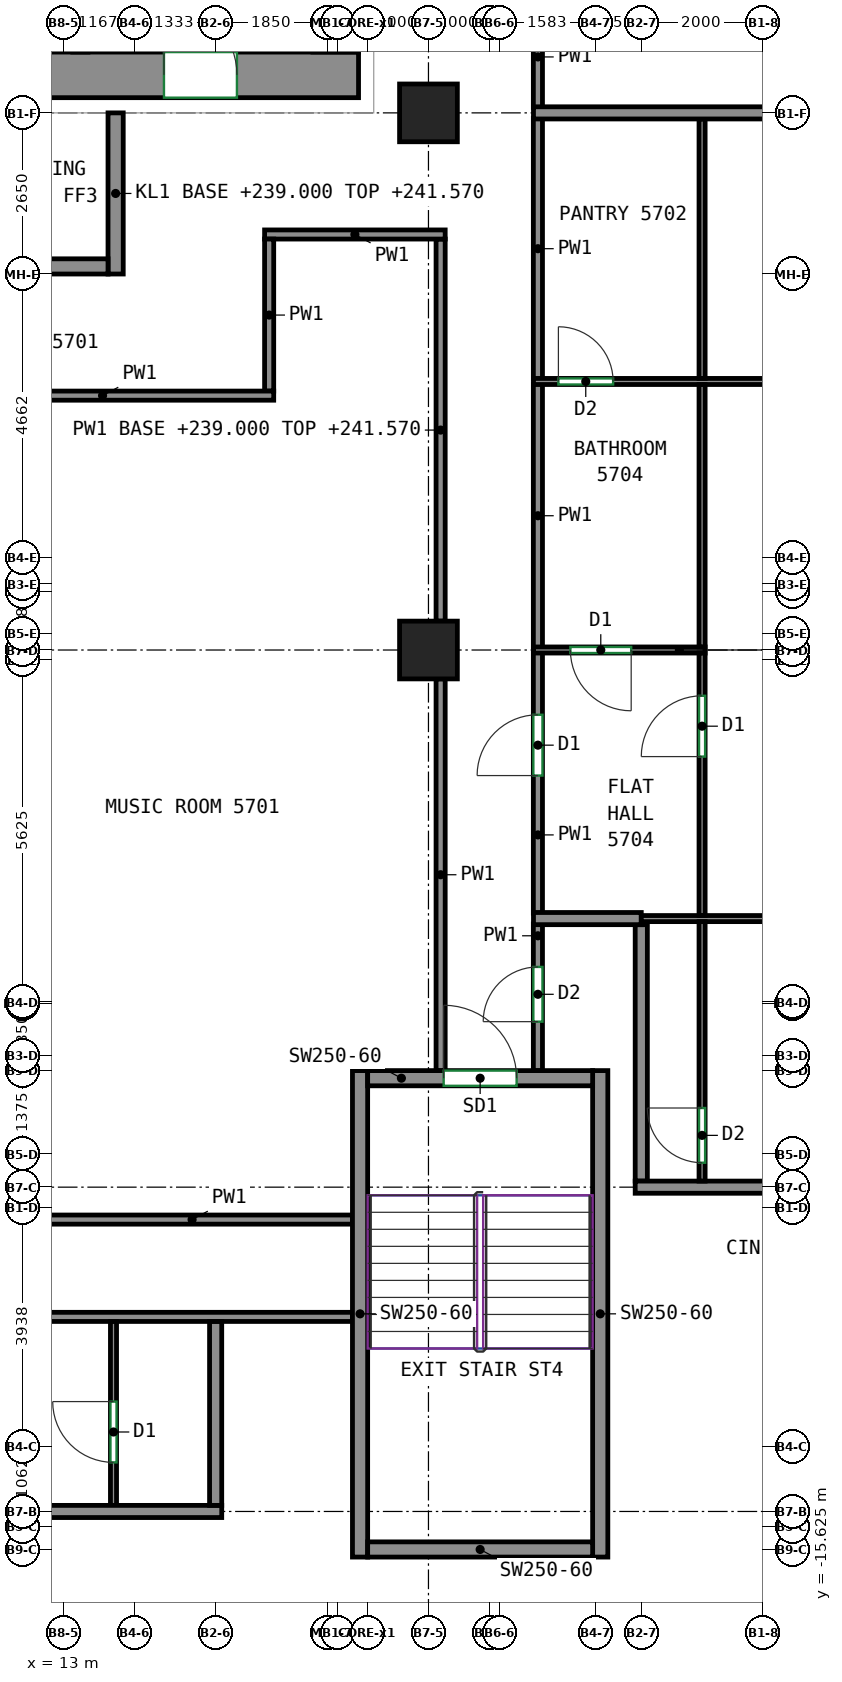
"""IFC4 building model, lengths in metres.
Left out: names, types, materials, properties, quantities, classifications, styles, units other than length and angle.
Written with IfcOpenShell. Run it as: python <this file> out.ifc"""

import sys

from ifc_helpers import new_model, si_unit, direction, frame, frame_2d, origin, origin_2d, place, context, subcontext, project, spatial, rectangle, extrude, source, transform, mapped, element, fill, save


model = new_model("IFC4")
c1 = context("Model", 3, precision=1e-05, world=origin(), true_north=direction((0.0, 1.0)))
c2 = subcontext(c1, "Body", "Model", "MODEL_VIEW")
j1 = project(units=[si_unit("LENGTHUNIT", "METRE"), si_unit("PLANEANGLEUNIT", "RADIAN")], contexts=[c1])
p1 = place(None, origin())
s1 = spatial("IfcSite", under=j1, at=p1, CompositionType="ELEMENT")
p2 = place(p1, origin())
s2 = spatial("IfcBuilding", under=s1, at=p2, CompositionType="ELEMENT")
p3 = place(p2, frame((0.0, 0.0, 239.0)))
s3 = spatial("IfcBuildingStorey", under=s2, at=p3, CompositionType="ELEMENT", Elevation=239.0)
m1 = source(origin(), c2, "Body", "SweptSolid", [
    extrude(rectangle(XDim=0.95, YDim=0.95, at=origin_2d()), origin(), (0.0, 0.0, 1.0), 3.12),
])
for number, where, z_axis, x_axis in (
    (1, (19.0, -0.833, 0.0), (0.0, 0.0, 1.0), (1.0, 0.0, 0.0)),
    (2, (19.0, 8.0, 0.0), (0.0, 0.0, 1.0), (1.0, 0.0, 0.0)),
):
    element("IfcColumn", number, at=place(p3, frame(where, z_axis=z_axis, x_axis=x_axis)), inside=s3, PredefinedType="COLUMN", context=c2, shape_type="MappedRepresentation", body=[
        mapped(m1, transform((0.0, 0.0, 0.0))),
    ])
m2 = source(origin(), c2, "Body", "SweptSolid", [
    extrude(rectangle(XDim=5.38, YDim=0.75, at=frame_2d((2.69, 0.0))), origin(), (0.0, 0.0, 1.0), 3.12),
])
p4 = place(p3, frame((12.47, 8.625, 0.0), z_axis=(0.0, 0.0, 1.0), x_axis=(1.0, 0.0, 0.0)))
e3 = element("IfcWall", 3, at=p4, inside=s3, PredefinedType="SHEAR", context=c2, shape_type="MappedRepresentation", body=[
    mapped(m2, transform((0.0, 0.0, 0.0))),
])
p5 = place(p4, frame((2.18, 0.0, 0.0)))
e4 = element("IfcOpeningElement", 4, at=p5, cuts=e3, PredefinedType="OPENING", context=c2, shape_type="SweptSolid", body=[
    extrude(rectangle(XDim=1.2, YDim=2.1, at=frame_2d((0.6, 1.05))), frame((0.0, 0.385, 0.0), z_axis=(0.0, -1.0, 0.0), x_axis=(1.0, 0.0, 0.0)), (0.0, 0.0, 1.0), 0.77),
])
m3 = source(origin(), c2, "Body", "SweptSolid", [
    extrude(rectangle(XDim=8.0, YDim=0.25, at=frame_2d((4.0, 0.0))), origin(), (0.0, 0.0, 1.0), 3.12),
])
for number, where, z_axis, x_axis in (
    (5, (17.875, -15.75, 0.0), (0.0, 0.0, 1.0), (0.0, 1.0, 0.0)),
    (6, (21.825, -15.75, 0.0), (0.0, 0.0, 1.0), (0.0, 1.0, 0.0)),
):
    element("IfcWall", number, at=place(p3, frame(where, z_axis=z_axis, x_axis=x_axis)), inside=s3, PredefinedType="SHEAR", context=c2, shape_type="MappedRepresentation", body=[
        mapped(m3, transform((0.0, 0.0, 0.0))),
    ])
m4 = source(origin(), c2, "Body", "SweptSolid", [
    extrude(rectangle(XDim=3.7, YDim=0.25, at=frame_2d((1.85, 0.0))), origin(), (0.0, 0.0, 1.0), 3.12),
])
p6 = place(p3, frame((18.0, -15.625, 0.0), z_axis=(0.0, 0.0, 1.0), x_axis=(1.0, 0.0, 0.0)))
e7 = element("IfcWall", 7, at=p6, inside=s3, PredefinedType="SHEAR", context=c2, shape_type="MappedRepresentation", body=[
    mapped(m4, transform((0.0, 0.0, 0.0))),
])
p7 = place(p3, frame((18.0, -7.875, 0.0), z_axis=(0.0, 0.0, 1.0), x_axis=(1.0, 0.0, 0.0)))
e8 = element("IfcWall", 8, at=p7, inside=s3, PredefinedType="SHEAR", context=c2, shape_type="MappedRepresentation", body=[
    mapped(m4, transform((0.0, 0.0, 0.0))),
])
p8 = place(p7, frame((1.25, 0.0, 0.0)))
e9 = element("IfcOpeningElement", 9, at=p8, cuts=e8, PredefinedType="OPENING", context=c2, shape_type="SweptSolid", body=[
    extrude(rectangle(XDim=1.2, YDim=2.1, at=frame_2d((0.6, 1.05))), frame((0.0, 0.135, 0.0), z_axis=(0.0, -1.0, 0.0), x_axis=(1.0, 0.0, 0.0)), (0.0, 0.0, 1.0), 0.27),
])
m5 = source(origin(), c2, "Body", "SweptSolid", [
    extrude(rectangle(XDim=2.65, YDim=0.25, at=frame_2d((1.325, 0.0))), origin(), (0.0, 0.0, 1.0), 2.57),
])
p9 = place(p3, frame((13.855, 5.35, 0.0), z_axis=(0.0, 0.0, 1.0), x_axis=(0.0, 1.0, 0.0)))
e10 = element("IfcWall", 10, at=p9, inside=s3, PredefinedType="PARTITIONING", context=c2, shape_type="MappedRepresentation", body=[
    mapped(m5, transform((0.0, 0.0, 0.0))),
])
m6 = source(origin(), c2, "Body", "SweptSolid", [
    extrude(rectangle(XDim=3.0, YDim=0.25, at=frame_2d((1.5, 0.0))), origin(), (0.0, 0.0, 1.0), 3.12),
])
p10 = place(p3, frame((10.73, 5.475, 0.0), z_axis=(0.0, 0.0, 1.0), x_axis=(1.0, 0.0, 0.0)))
e11 = element("IfcWall", 11, at=p10, inside=s3, PredefinedType="PARTITIONING", context=c2, shape_type="MappedRepresentation", body=[
    mapped(m6, transform((0.0, 0.0, 0.0))),
])
p11 = place(p10, frame((1.1, 0.0, 0.0)))
e12 = element("IfcOpeningElement", 12, at=p11, cuts=e11, PredefinedType="OPENING", context=c2, shape_type="SweptSolid", body=[
    extrude(rectangle(XDim=0.8, YDim=2.0, at=frame_2d((0.4, 1.0))), frame((0.0, 0.135, 0.0), z_axis=(0.0, -1.0, 0.0), x_axis=(1.0, 0.0, 0.0)), (0.0, 0.0, 1.0), 0.27),
])
p12 = place(p3, frame((-11.8, -11.8, 0.0), z_axis=(0.0, 0.0, 1.0), x_axis=(1.0, 0.0, 0.0)))
e13 = element("IfcWall", 13, at=p12, inside=s3, PredefinedType="PARTITIONING", context=c2, shape_type="SweptSolid", body=[
    extrude(rectangle(XDim=29.55, YDim=0.15, at=frame_2d((14.775, 0.0))), origin(), (0.0, 0.0, 1.0), 3.12),
])
p13 = place(p12, frame((4.802, 0.0, 0.0)))
e14 = element("IfcOpeningElement", 14, at=p13, cuts=e13, PredefinedType="OPENING", context=c2, shape_type="SweptSolid", body=[
    extrude(rectangle(XDim=1.0, YDim=2.1, at=frame_2d((0.5, 1.05))), frame((0.0, 0.085, 0.0), z_axis=(0.0, -1.0, 0.0), x_axis=(1.0, 0.0, 0.0)), (0.0, 0.0, 1.0), 0.17),
])
p14 = place(p12, frame((23.314, 0.0, 0.0)))
e15 = element("IfcOpeningElement", 15, at=p14, cuts=e13, PredefinedType="OPENING", context=c2, shape_type="SweptSolid", body=[
    extrude(rectangle(XDim=1.0, YDim=2.1, at=frame_2d((0.5, 1.05))), frame((0.0, 0.085, 0.0), z_axis=(0.0, -1.0, 0.0), x_axis=(1.0, 0.0, 0.0)), (0.0, 0.0, 1.0), 0.17),
])
p15 = place(p3, frame((20.8, -7.75, 0.0), z_axis=(0.0, 0.0, 1.0), x_axis=(0.0, 1.0, 0.0)))
e16 = element("IfcWall", 16, at=p15, inside=s3, PredefinedType="PARTITIONING", context=c2, shape_type="SweptSolid", body=[
    extrude(rectangle(XDim=2.41, YDim=0.15, at=frame_2d((1.205, 0.0))), origin(), (0.0, 0.0, 1.0), 3.12),
])
p16 = place(p15, frame((0.805, 0.0, 0.0)))
e17 = element("IfcOpeningElement", 17, at=p16, cuts=e16, PredefinedType="OPENING", context=c2, shape_type="SweptSolid", body=[
    extrude(rectangle(XDim=0.9, YDim=2.1, at=frame_2d((0.45, 1.05))), frame((0.0, 0.085, 0.0), z_axis=(0.0, -1.0, 0.0), x_axis=(1.0, 0.0, 0.0)), (0.0, 0.0, 1.0), 0.17),
])
p17 = place(p3, frame((20.8, -5.16, 0.0), z_axis=(0.0, 0.0, 1.0), x_axis=(0.0, 1.0, 0.0)))
e18 = element("IfcWall", 18, at=p17, inside=s3, PredefinedType="PARTITIONING", context=c2, shape_type="SweptSolid", body=[
    extrude(rectangle(XDim=4.287, YDim=0.15, at=frame_2d((2.144, 0.0))), origin(), (0.0, 0.0, 1.0), 3.12),
])
p18 = place(p17, frame((2.262, 0.0, 0.0)))
e19 = element("IfcOpeningElement", 19, at=p18, cuts=e18, PredefinedType="OPENING", context=c2, shape_type="SweptSolid", body=[
    extrude(rectangle(XDim=1.0, YDim=2.1, at=frame_2d((0.5, 1.05))), frame((0.0, 0.085, 0.0), z_axis=(0.0, -1.0, 0.0), x_axis=(1.0, 0.0, 0.0)), (0.0, 0.0, 1.0), 0.17),
])
p19 = place(p3, frame((20.8, -0.793, 0.0), z_axis=(0.0, 0.0, 1.0), x_axis=(0.0, 1.0, 0.0)))
e20 = element("IfcWall", 20, at=p19, inside=s3, PredefinedType="PARTITIONING", context=c2, shape_type="SweptSolid", body=[
    extrude(rectangle(XDim=4.336, YDim=0.15, at=frame_2d((2.168, 0.0))), origin(), (0.0, 0.0, 1.0), 3.12),
])
p20 = place(p3, frame((20.8, 3.623, 0.0), z_axis=(0.0, 0.0, 1.0), x_axis=(0.0, 1.0, 0.0)))
e21 = element("IfcWall", 21, at=p20, inside=s3, PredefinedType="PARTITIONING", context=c2, shape_type="SweptSolid", body=[
    extrude(rectangle(XDim=4.287, YDim=0.15, at=frame_2d((2.144, 0.0))), origin(), (0.0, 0.0, 1.0), 3.12),
])
p21 = place(p3, frame((20.8, 8.09, 0.0), z_axis=(0.0, 0.0, 1.0), x_axis=(0.0, 1.0, 0.0)))
e22 = element("IfcWall", 22, at=p21, inside=s3, PredefinedType="PARTITIONING", context=c2, shape_type="SweptSolid", body=[
    extrude(rectangle(XDim=1.66, YDim=0.15, at=frame_2d((0.83, 0.0))), origin(), (0.0, 0.0, 1.0), 3.12),
])
p22 = place(p3, frame((19.2, -7.75, 0.0), z_axis=(0.0, 0.0, 1.0), x_axis=(0.0, 1.0, 0.0)))
e23 = element("IfcWall", 23, at=p22, inside=s3, PredefinedType="PARTITIONING", context=c2, shape_type="SweptSolid", body=[
    extrude(rectangle(XDim=6.442, YDim=0.15, at=frame_2d((3.221, 0.0))), origin(), (0.0, 0.0, 1.0), 3.12),
])
p23 = place(p3, frame((19.2, -0.358, 0.0), z_axis=(0.0, 0.0, 1.0), x_axis=(0.0, 1.0, 0.0)))
e24 = element("IfcWall", 24, at=p23, inside=s3, PredefinedType="PARTITIONING", context=c2, shape_type="SweptSolid", body=[
    extrude(rectangle(XDim=6.283, YDim=0.15, at=frame_2d((3.142, 0.0))), origin(), (0.0, 0.0, 1.0), 2.57),
])
p24 = place(p3, frame((16.305, 6.0, 0.0), z_axis=(0.0, 0.0, 1.0), x_axis=(1.0, 0.0, 0.0)))
e25 = element("IfcWall", 25, at=p24, inside=s3, PredefinedType="PARTITIONING", context=c2, shape_type="SweptSolid", body=[
    extrude(rectangle(XDim=2.97, YDim=0.15, at=frame_2d((1.485, 0.0))), origin(), (0.0, 0.0, 1.0), 3.12),
])
p25 = place(p3, frame((16.38, 3.425, 0.0), z_axis=(0.0, 0.0, 1.0), x_axis=(0.0, 1.0, 0.0)))
e26 = element("IfcWall", 26, at=p25, inside=s3, PredefinedType="PARTITIONING", context=c2, shape_type="SweptSolid", body=[
    extrude(rectangle(XDim=2.5, YDim=0.15, at=frame_2d((1.25, 0.0))), origin(), (0.0, 0.0, 1.0), 3.12),
])
p26 = place(p3, frame((10.825, 3.35, 0.0), z_axis=(0.0, 0.0, 1.0), x_axis=(1.0, 0.0, 0.0)))
e27 = element("IfcWall", 27, at=p26, inside=s3, PredefinedType="PARTITIONING", context=c2, shape_type="SweptSolid", body=[
    extrude(rectangle(XDim=5.63, YDim=0.15, at=frame_2d((2.815, 0.0))), origin(), (0.0, 0.0, 1.0), 3.12),
])
p27 = place(p3, frame((12.475, -10.2, 0.0), z_axis=(0.0, 0.0, 1.0), x_axis=(1.0, 0.0, 0.0)))
e28 = element("IfcWall", 28, at=p27, inside=s3, PredefinedType="PARTITIONING", context=c2, shape_type="SweptSolid", body=[
    extrude(rectangle(XDim=5.275, YDim=0.15, at=frame_2d((2.637, 0.0))), origin(), (0.0, 0.0, 1.0), 3.12),
])
p28 = place(p3, frame((13.82, -14.9, 0.0), z_axis=(0.0, 0.0, 1.0), x_axis=(0.0, 1.0, 0.0)))
e29 = element("IfcWall", 29, at=p28, inside=s3, PredefinedType="PARTITIONING", context=c2, shape_type="SweptSolid", body=[
    extrude(rectangle(XDim=3.023, YDim=0.1, at=frame_2d((1.511, 0.0))), origin(), (0.0, 0.0, 1.0), 3.12),
])
p29 = place(p28, frame((0.707, 0.0, 0.0)))
e30 = element("IfcOpeningElement", 30, at=p29, cuts=e29, PredefinedType="OPENING", context=c2, shape_type="SweptSolid", body=[
    extrude(rectangle(XDim=1.0, YDim=2.1, at=frame_2d((0.5, 1.05))), frame((0.0, 0.06, 0.0), z_axis=(0.0, -1.0, 0.0), x_axis=(1.0, 0.0, 0.0)), (0.0, 0.0, 1.0), 0.12),
])
p30 = place(p3, frame((11.9, -15.0, 0.0), z_axis=(0.0, 0.0, 1.0), x_axis=(1.0, 0.0, 0.0)))
e31 = element("IfcWall", 31, at=p30, inside=s3, PredefinedType="PARTITIONING", context=c2, shape_type="SweptSolid", body=[
    extrude(rectangle(XDim=3.7, YDim=0.2, at=frame_2d((1.85, 0.0))), origin(), (0.0, 0.0, 1.0), 3.12),
])
p31 = place(p3, frame((15.5, -14.9, 0.0), z_axis=(0.0, 0.0, 1.0), x_axis=(0.0, 1.0, 0.0)))
e32 = element("IfcWall", 32, at=p31, inside=s3, PredefinedType="PARTITIONING", context=c2, shape_type="SweptSolid", body=[
    extrude(rectangle(XDim=3.023, YDim=0.2, at=frame_2d((1.511, 0.0))), origin(), (0.0, 0.0, 1.0), 3.12),
])
p32 = place(p3, frame((22.5, -9.567, 0.0), z_axis=(0.0, 0.0, 1.0), x_axis=(0.0, 1.0, 0.0)))
e33 = element("IfcWall", 33, at=p32, inside=s3, PredefinedType="PARTITIONING", context=c2, shape_type="SweptSolid", body=[
    extrude(rectangle(XDim=4.217, YDim=0.2, at=frame_2d((2.108, 0.0))), origin(), (0.0, 0.0, 1.0), 3.12),
])
p33 = place(p3, frame((22.4, -9.667, 0.0), z_axis=(0.0, 0.0, 1.0), x_axis=(1.0, 0.0, 0.0)))
e34 = element("IfcWall", 34, at=p33, inside=s3, PredefinedType="PARTITIONING", context=c2, shape_type="SweptSolid", body=[
    extrude(rectangle(XDim=6.3, YDim=0.2, at=frame_2d((3.15, 0.0))), origin(), (0.0, 0.0, 1.0), 3.12),
])
p34 = place(p3, frame((20.727, -5.25, 0.0), z_axis=(0.0, 0.0, 1.0), x_axis=(1.0, 0.0, 0.0)))
e35 = element("IfcWall", 35, at=p34, inside=s3, PredefinedType="PARTITIONING", context=c2, shape_type="SweptSolid", body=[
    extrude(rectangle(XDim=1.773, YDim=0.2, at=frame_2d((0.886, 0.0))), origin(), (0.0, 0.0, 1.0), 3.12),
])
p35 = place(p3, frame((22.5, -5.25, 0.0), z_axis=(0.0, 0.0, 1.0), x_axis=(1.0, 0.0, 0.0)))
e36 = element("IfcWall", 36, at=p35, inside=s3, PredefinedType="PARTITIONING", context=c2, shape_type="SweptSolid", body=[
    extrude(rectangle(XDim=6.75, YDim=0.1, at=frame_2d((3.375, 0.0))), origin(), (0.0, 0.0, 1.0), 3.12),
])
p36 = place(p35, frame((3.022, 0.0, 0.0)))
e37 = element("IfcOpeningElement", 37, at=p36, cuts=e36, PredefinedType="OPENING", context=c2, shape_type="SweptSolid", body=[
    extrude(rectangle(XDim=0.9, YDim=2.1, at=frame_2d((0.45, 1.05))), frame((0.0, 0.06, 0.0), z_axis=(0.0, -1.0, 0.0), x_axis=(1.0, 0.0, 0.0)), (0.0, 0.0, 1.0), 0.12),
])
p37 = place(p3, frame((23.5, -9.567, 0.0), z_axis=(0.0, 0.0, 1.0), x_axis=(0.0, 1.0, 0.0)))
e38 = element("IfcWall", 38, at=p37, inside=s3, PredefinedType="PARTITIONING", context=c2, shape_type="SweptSolid", body=[
    extrude(rectangle(XDim=4.267, YDim=0.1, at=frame_2d((2.133, 0.0))), origin(), (0.0, 0.0, 1.0), 3.12),
])
p38 = place(p37, frame((0.302, 0.0, 0.0)))
e39 = element("IfcOpeningElement", 39, at=p38, cuts=e38, PredefinedType="OPENING", context=c2, shape_type="SweptSolid", body=[
    extrude(rectangle(XDim=0.9, YDim=2.1, at=frame_2d((0.45, 1.05))), frame((0.0, 0.06, 0.0), z_axis=(0.0, -1.0, 0.0), x_axis=(1.0, 0.0, 0.0)), (0.0, 0.0, 1.0), 0.12),
])
p39 = place(p3, frame((23.55, -0.833, 0.0), z_axis=(0.0, 0.0, 1.0), x_axis=(-1.0, 0.0, 0.0)))
e40 = element("IfcWall", 40, at=p39, inside=s3, PredefinedType="PARTITIONING", context=c2, shape_type="SweptSolid", body=[
    extrude(rectangle(XDim=2.823, YDim=0.1, at=frame_2d((1.412, 0.0))), origin(), (0.0, 0.0, 1.0), 2.57),
])
p40 = place(p39, frame((1.216, 0.0, 0.0)))
e41 = element("IfcOpeningElement", 41, at=p40, cuts=e40, PredefinedType="OPENING", context=c2, shape_type="SweptSolid", body=[
    extrude(rectangle(XDim=1.0, YDim=2.1, at=frame_2d((0.5, 1.05))), frame((0.0, 0.06, 0.0), z_axis=(0.0, -1.0, 0.0), x_axis=(1.0, 0.0, 0.0)), (0.0, 0.0, 1.0), 0.12),
])
p41 = place(p3, frame((23.5, -5.2, 0.0), z_axis=(0.0, 0.0, 1.0), x_axis=(0.0, 1.0, 0.0)))
e42 = element("IfcWall", 42, at=p41, inside=s3, PredefinedType="PARTITIONING", context=c2, shape_type="SweptSolid", body=[
    extrude(rectangle(XDim=4.317, YDim=0.1, at=frame_2d((2.158, 0.0))), origin(), (0.0, 0.0, 1.0), 3.12),
])
p42 = place(p41, frame((2.614, 0.0, 0.0)))
e43 = element("IfcOpeningElement", 43, at=p42, cuts=e42, PredefinedType="OPENING", context=c2, shape_type="SweptSolid", body=[
    extrude(rectangle(XDim=1.0, YDim=2.1, at=frame_2d((0.5, 1.05))), frame((0.0, 0.06, 0.0), z_axis=(0.0, -1.0, 0.0), x_axis=(1.0, 0.0, 0.0)), (0.0, 0.0, 1.0), 0.12),
])
p43 = place(p3, frame((20.727, 3.583, 0.0), z_axis=(0.0, 0.0, 1.0), x_axis=(1.0, 0.0, 0.0)))
e44 = element("IfcWall", 44, at=p43, inside=s3, PredefinedType="PARTITIONING", context=c2, shape_type="SweptSolid", body=[
    extrude(rectangle(XDim=8.523, YDim=0.1, at=frame_2d((4.261, 0.0))), origin(), (0.0, 0.0, 1.0), 3.12),
])
p44 = place(p43, frame((0.41, 0.0, 0.0)))
e45 = element("IfcOpeningElement", 45, at=p44, cuts=e44, PredefinedType="OPENING", context=c2, shape_type="SweptSolid", body=[
    extrude(rectangle(XDim=0.9, YDim=2.1, at=frame_2d((0.45, 1.05))), frame((0.0, 0.06, 0.0), z_axis=(0.0, -1.0, 0.0), x_axis=(1.0, 0.0, 0.0)), (0.0, 0.0, 1.0), 0.12),
])
p45 = place(p43, frame((6.21, 0.0, 0.0)))
e46 = element("IfcOpeningElement", 46, at=p45, cuts=e44, PredefinedType="OPENING", context=c2, shape_type="SweptSolid", body=[
    extrude(rectangle(XDim=0.9, YDim=2.1, at=frame_2d((0.45, 1.05))), frame((0.0, 0.06, 0.0), z_axis=(0.0, -1.0, 0.0), x_axis=(1.0, 0.0, 0.0)), (0.0, 0.0, 1.0), 0.12),
])
p46 = place(p3, frame((23.5, -0.783, 0.0), z_axis=(0.0, 0.0, 1.0), x_axis=(0.0, 1.0, 0.0)))
e47 = element("IfcWall", 47, at=p46, inside=s3, PredefinedType="PARTITIONING", context=c2, shape_type="SweptSolid", body=[
    extrude(rectangle(XDim=4.316, YDim=0.1, at=frame_2d((2.158, 0.0))), origin(), (0.0, 0.0, 1.0), 3.12),
])
p47 = place(p3, frame((23.5, 3.633, 0.0), z_axis=(0.0, 0.0, 1.0), x_axis=(0.0, 1.0, 0.0)))
e48 = element("IfcWall", 48, at=p47, inside=s3, PredefinedType="PARTITIONING", context=c2, shape_type="SweptSolid", body=[
    extrude(rectangle(XDim=4.267, YDim=0.1, at=frame_2d((2.133, 0.0))), origin(), (0.0, 0.0, 1.0), 3.12),
])
p48 = place(p3, frame((20.727, 8.0, 0.0), z_axis=(0.0, 0.0, 1.0), x_axis=(1.0, 0.0, 0.0)))
e49 = element("IfcWall", 49, at=p48, inside=s3, PredefinedType="PARTITIONING", context=c2, shape_type="SweptSolid", body=[
    extrude(rectangle(XDim=7.973, YDim=0.2, at=frame_2d((3.986, 0.0))), origin(), (0.0, 0.0, 1.0), 2.57),
])
p49 = place(p5, origin())
e50 = element("IfcDoor", 50, at=p49, inside=s3, OperationType="DOUBLE_DOOR_SINGLE_SWING", PredefinedType="DOOR", context=c2, shape_type="SweptSolid", body=[
    extrude(rectangle(XDim=1.2, YDim=2.1, at=frame_2d((0.6, 1.05))), frame((0.0, 0.28, 0.0), z_axis=(0.0, -1.0, 0.0), x_axis=(1.0, 0.0, 0.0)), (0.0, 0.0, 1.0), 0.05),
])
fill(e4, e50)
p50 = place(p8, origin())
e51 = element("IfcDoor", 51, at=p50, inside=s3, OperationType="DOUBLE_DOOR_SINGLE_SWING", PredefinedType="DOOR", context=c2, shape_type="SweptSolid", body=[
    extrude(rectangle(XDim=1.2, YDim=2.1, at=frame_2d((0.6, 1.05))), frame((0.0, 0.025, 0.0), z_axis=(0.0, -1.0, 0.0), x_axis=(1.0, 0.0, 0.0)), (0.0, 0.0, 1.0), 0.05),
])
fill(e9, e51)
p51 = place(p29, origin())
e52 = element("IfcDoor", 52, at=p51, inside=s3, OperationType="SINGLE_SWING_RIGHT", PredefinedType="DOOR", context=c2, shape_type="SweptSolid", body=[
    extrude(rectangle(XDim=1.0, YDim=2.1, at=frame_2d((0.5, 1.05))), frame((0.0, 0.025, 0.0), z_axis=(0.0, -1.0, 0.0), x_axis=(1.0, 0.0, 0.0)), (0.0, 0.0, 1.0), 0.05),
])
fill(e30, e52)
p52 = place(p38, origin())
e53 = element("IfcDoor", 53, at=p52, inside=s3, OperationType="SINGLE_SWING_RIGHT", PredefinedType="DOOR", context=c2, shape_type="SweptSolid", body=[
    extrude(rectangle(XDim=0.9, YDim=2.1, at=frame_2d((0.45, 1.05))), frame((0.0, 0.025, 0.0), z_axis=(0.0, -1.0, 0.0), x_axis=(1.0, 0.0, 0.0)), (0.0, 0.0, 1.0), 0.05),
])
fill(e39, e53)
p53 = place(p16, origin())
e54 = element("IfcDoor", 54, at=p53, inside=s3, OperationType="SINGLE_SWING_LEFT", PredefinedType="DOOR", context=c2, shape_type="SweptSolid", body=[
    extrude(rectangle(XDim=0.9, YDim=2.1, at=frame_2d((0.45, 1.05))), frame((0.0, 0.025, 0.0), z_axis=(0.0, -1.0, 0.0), x_axis=(1.0, 0.0, 0.0)), (0.0, 0.0, 1.0), 0.05),
])
fill(e17, e54)
p54 = place(p18, origin())
e55 = element("IfcDoor", 55, at=p54, inside=s3, OperationType="SINGLE_SWING_LEFT", PredefinedType="DOOR", context=c2, shape_type="SweptSolid", body=[
    extrude(rectangle(XDim=1.0, YDim=2.1, at=frame_2d((0.5, 1.05))), frame((0.0, 0.025, 0.0), z_axis=(0.0, -1.0, 0.0), x_axis=(1.0, 0.0, 0.0)), (0.0, 0.0, 1.0), 0.05),
])
fill(e19, e55)
p55 = place(p42, origin())
e56 = element("IfcDoor", 56, at=p55, inside=s3, OperationType="SINGLE_SWING_LEFT", PredefinedType="DOOR", context=c2, shape_type="SweptSolid", body=[
    extrude(rectangle(XDim=1.0, YDim=2.1, at=frame_2d((0.5, 1.05))), frame((0.0, 0.025, 0.0), z_axis=(0.0, -1.0, 0.0), x_axis=(1.0, 0.0, 0.0)), (0.0, 0.0, 1.0), 0.05),
])
fill(e43, e56)
p56 = place(p40, origin())
e57 = element("IfcDoor", 57, at=p56, inside=s3, OperationType="SINGLE_SWING_LEFT", PredefinedType="DOOR", context=c2, shape_type="SweptSolid", body=[
    extrude(rectangle(XDim=1.0, YDim=2.1, at=frame_2d((0.5, 1.05))), frame((0.0, 0.025, 0.0), z_axis=(0.0, -1.0, 0.0), x_axis=(1.0, 0.0, 0.0)), (0.0, 0.0, 1.0), 0.05),
])
fill(e41, e57)
p57 = place(p44, origin())
e58 = element("IfcDoor", 58, at=p57, inside=s3, OperationType="SINGLE_SWING_LEFT", PredefinedType="DOOR", context=c2, shape_type="SweptSolid", body=[
    extrude(rectangle(XDim=0.9, YDim=2.1, at=frame_2d((0.45, 1.05))), frame((0.0, 0.025, 0.0), z_axis=(0.0, -1.0, 0.0), x_axis=(1.0, 0.0, 0.0)), (0.0, 0.0, 1.0), 0.05),
])
fill(e45, e58)
save(model, sys.argv[1])
